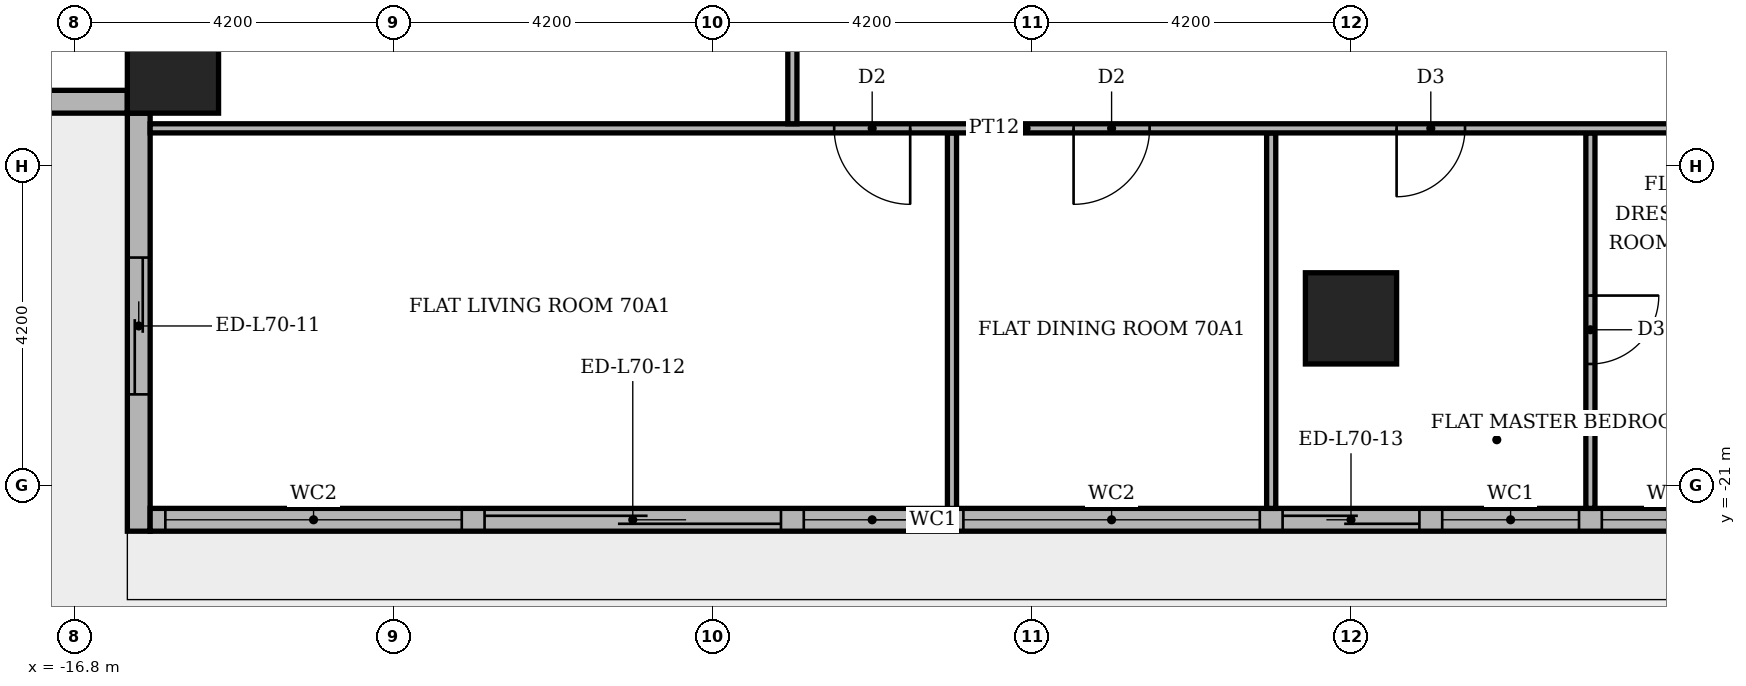
"""IFC4 building model, lengths in metres.
Left out: names, types, materials, properties, quantities, classifications, styles, units other than length and angle.
Written with IfcOpenShell. Run it as: python <this file> out.ifc"""

import sys

from ifc_helpers import new_model, si_unit, direction, frame, frame_2d, origin, origin_2d, place, context, subcontext, project, spatial, rectangle, extrude, element, fill, save


model = new_model("IFC4")
c1 = context("Model", 3, precision=1e-05, world=origin(), true_north=direction((0.0, 1.0)))
c2 = subcontext(c1, "Body", "Model", "MODEL_VIEW")
j1 = project(units=[si_unit("LENGTHUNIT", "METRE"), si_unit("PLANEANGLEUNIT", "RADIAN")], contexts=[c1])
p1 = place(None, origin())
s1 = spatial("IfcSite", under=j1, at=p1, CompositionType="ELEMENT")
p2 = place(p1, origin())
s2 = spatial("IfcBuilding", under=s1, at=p2, CompositionType="ELEMENT")
p3 = place(p2, frame((0.0, 0.0, 292.8)))
s3 = spatial("IfcBuildingStorey", under=s2, at=p3, CompositionType="ELEMENT", Elevation=292.8)
for number, where, z_axis, x_axis in (
    (1, (0.0, -18.8, -0.35), (0.0, 0.0, 1.0), (1.0, 0.0, 0.0)),
    (2, (-15.5, -15.5, -0.35), (0.0, 0.0, 1.0), (1.0, 0.0, 0.0)),
):
    element("IfcColumn", number, at=place(p3, frame(where, z_axis=z_axis, x_axis=x_axis)), inside=s3, PredefinedType="COLUMN", context=c2, shape_type="SweptSolid", body=[
        extrude(rectangle(XDim=1.2, YDim=1.2, at=origin_2d()), origin(), (0.0, 0.0, 1.0), 4.25),
    ])
p4 = place(p3, frame((-21.3, -15.95, 0.0), z_axis=(0.0, 0.0, 1.0), x_axis=(1.0, 0.0, 0.0)))
e3 = element("IfcWall", 3, at=p4, inside=s3, PredefinedType="STANDARD", context=c2, shape_type="SweptSolid", body=[
    extrude(rectangle(XDim=5.2, YDim=0.3, at=frame_2d((2.6, 0.0))), origin(), (0.0, 0.0, 1.0), 3.55),
])
p5 = place(p4, frame((1.5, 0.0, 0.6)))
e4 = element("IfcOpeningElement", 4, at=p5, cuts=e3, PredefinedType="OPENING", context=c2, shape_type="SweptSolid", body=[
    extrude(rectangle(XDim=1.8, YDim=2.4, at=frame_2d((0.9, 1.2))), frame((0.0, 0.16, 0.0), z_axis=(0.0, -1.0, 0.0), x_axis=(1.0, 0.0, 0.0)), (0.0, 0.0, 1.0), 0.32),
])
p6 = place(p3, frame((-15.95, -16.1, 0.0), z_axis=(0.0, 0.0, 1.0), x_axis=(0.0, -1.0, 0.0)))
e5 = element("IfcWall", 5, at=p6, inside=s3, PredefinedType="STANDARD", context=c2, shape_type="SweptSolid", body=[
    extrude(rectangle(XDim=5.5, YDim=0.3, at=frame_2d((2.75, 0.0))), origin(), (0.0, 0.0, 1.0), 3.55),
])
p7 = place(p6, frame((1.9, 0.0, 0.0)))
e6 = element("IfcOpeningElement", 6, at=p7, cuts=e5, PredefinedType="OPENING", context=c2, shape_type="SweptSolid", body=[
    extrude(rectangle(XDim=1.8, YDim=2.4, at=frame_2d((0.9, 1.2))), frame((0.0, 0.16, 0.0), z_axis=(0.0, -1.0, 0.0), x_axis=(1.0, 0.0, 0.0)), (0.0, 0.0, 1.0), 0.32),
])
p8 = place(p3, frame((-15.8, -21.45, 0.0), z_axis=(0.0, 0.0, 1.0), x_axis=(1.0, 0.0, 0.0)))
e7 = element("IfcWall", 7, at=p8, inside=s3, PredefinedType="STANDARD", context=c2, shape_type="SweptSolid", body=[
    extrude(rectangle(XDim=31.9, YDim=0.3, at=frame_2d((15.95, 0.0))), origin(), (0.0, 0.0, 1.0), 3.55),
])
p9 = place(p8, frame((0.2, 0.0, 0.6)))
e8 = element("IfcOpeningElement", 8, at=p9, cuts=e7, PredefinedType="OPENING", context=c2, shape_type="SweptSolid", body=[
    extrude(rectangle(XDim=3.9, YDim=2.4, at=frame_2d((1.95, 1.2))), frame((0.0, 0.16, 0.0), z_axis=(0.0, -1.0, 0.0), x_axis=(1.0, 0.0, 0.0)), (0.0, 0.0, 1.0), 0.32),
])
p10 = place(p8, frame((4.4, 0.0, 0.0)))
e9 = element("IfcOpeningElement", 9, at=p10, cuts=e7, PredefinedType="OPENING", context=c2, shape_type="SweptSolid", body=[
    extrude(rectangle(XDim=3.9, YDim=2.4, at=frame_2d((1.95, 1.2))), frame((0.0, 0.16, 0.0), z_axis=(0.0, -1.0, 0.0), x_axis=(1.0, 0.0, 0.0)), (0.0, 0.0, 1.0), 0.32),
])
p11 = place(p8, frame((8.6, 0.0, 0.6)))
e10 = element("IfcOpeningElement", 10, at=p11, cuts=e7, PredefinedType="OPENING", context=c2, shape_type="SweptSolid", body=[
    extrude(rectangle(XDim=1.8, YDim=2.4, at=frame_2d((0.9, 1.2))), frame((0.0, 0.16, 0.0), z_axis=(0.0, -1.0, 0.0), x_axis=(1.0, 0.0, 0.0)), (0.0, 0.0, 1.0), 0.32),
])
p12 = place(p8, frame((10.7, 0.0, 0.6)))
e11 = element("IfcOpeningElement", 11, at=p12, cuts=e7, PredefinedType="OPENING", context=c2, shape_type="SweptSolid", body=[
    extrude(rectangle(XDim=3.9, YDim=2.4, at=frame_2d((1.95, 1.2))), frame((0.0, 0.16, 0.0), z_axis=(0.0, -1.0, 0.0), x_axis=(1.0, 0.0, 0.0)), (0.0, 0.0, 1.0), 0.32),
])
p13 = place(p8, frame((14.9, 0.0, 0.0)))
e12 = element("IfcOpeningElement", 12, at=p13, cuts=e7, PredefinedType="OPENING", context=c2, shape_type="SweptSolid", body=[
    extrude(rectangle(XDim=1.8, YDim=2.4, at=frame_2d((0.9, 1.2))), frame((0.0, 0.16, 0.0), z_axis=(0.0, -1.0, 0.0), x_axis=(1.0, 0.0, 0.0)), (0.0, 0.0, 1.0), 0.32),
])
p14 = place(p8, frame((17.0, 0.0, 0.6)))
e13 = element("IfcOpeningElement", 13, at=p14, cuts=e7, PredefinedType="OPENING", context=c2, shape_type="SweptSolid", body=[
    extrude(rectangle(XDim=1.8, YDim=2.4, at=frame_2d((0.9, 1.2))), frame((0.0, 0.16, 0.0), z_axis=(0.0, -1.0, 0.0), x_axis=(1.0, 0.0, 0.0)), (0.0, 0.0, 1.0), 0.32),
])
p15 = place(p8, frame((19.1, 0.0, 0.6)))
e14 = element("IfcOpeningElement", 14, at=p15, cuts=e7, PredefinedType="OPENING", context=c2, shape_type="SweptSolid", body=[
    extrude(rectangle(XDim=1.8, YDim=2.4, at=frame_2d((0.9, 1.2))), frame((0.0, 0.16, 0.0), z_axis=(0.0, -1.0, 0.0), x_axis=(1.0, 0.0, 0.0)), (0.0, 0.0, 1.0), 0.32),
])
p16 = place(p8, frame((21.2, 0.0, 0.6)))
e15 = element("IfcOpeningElement", 15, at=p16, cuts=e7, PredefinedType="OPENING", context=c2, shape_type="SweptSolid", body=[
    extrude(rectangle(XDim=1.8, YDim=2.4, at=frame_2d((0.9, 1.2))), frame((0.0, 0.16, 0.0), z_axis=(0.0, -1.0, 0.0), x_axis=(1.0, 0.0, 0.0)), (0.0, 0.0, 1.0), 0.32),
])
p17 = place(p8, frame((23.3, 0.0, 0.6)))
e16 = element("IfcOpeningElement", 16, at=p17, cuts=e7, PredefinedType="OPENING", context=c2, shape_type="SweptSolid", body=[
    extrude(rectangle(XDim=6.0, YDim=2.4, at=frame_2d((3.0, 1.2))), frame((0.0, 0.16, 0.0), z_axis=(0.0, -1.0, 0.0), x_axis=(1.0, 0.0, 0.0)), (0.0, 0.0, 1.0), 0.32),
])
for number, where, z_axis, x_axis in (
    (17, (-5.25, -21.3, 0.0), (0.0, 0.0, 1.0), (0.0, 1.0, 0.0)),
    (18, (-1.05, -21.3, 0.0), (0.0, 0.0, 1.0), (0.0, 1.0, 0.0)),
):
    element("IfcWall", number, at=place(p3, frame(where, z_axis=z_axis, x_axis=x_axis)), inside=s3, PredefinedType="PARTITIONING", context=c2, shape_type="SweptSolid", body=[
        extrude(rectangle(XDim=4.94, YDim=0.12, at=frame_2d((2.47, 0.0))), origin(), (0.0, 0.0, 1.0), 3.55),
    ])
p18 = place(p3, frame((3.15, -21.3, 0.0), z_axis=(0.0, 0.0, 1.0), x_axis=(0.0, 1.0, 0.0)))
e19 = element("IfcWall", 19, at=p18, inside=s3, PredefinedType="PARTITIONING", context=c2, shape_type="SweptSolid", body=[
    extrude(rectangle(XDim=4.94, YDim=0.12, at=frame_2d((2.47, 0.0))), origin(), (0.0, 0.0, 1.0), 3.55),
])
p19 = place(p18, frame((1.9, 0.0, 0.0)))
e20 = element("IfcOpeningElement", 20, at=p19, cuts=e19, PredefinedType="OPENING", context=c2, shape_type="SweptSolid", body=[
    extrude(rectangle(XDim=0.9, YDim=2.1, at=frame_2d((0.45, 1.05))), frame((0.0, 0.07, 0.0), z_axis=(0.0, -1.0, 0.0), x_axis=(1.0, 0.0, 0.0)), (0.0, 0.0, 1.0), 0.14),
])
p20 = place(p3, frame((-15.8, -16.3, 0.0), z_axis=(0.0, 0.0, 1.0), x_axis=(1.0, 0.0, 0.0)))
e21 = element("IfcWall", 21, at=p20, inside=s3, PredefinedType="PARTITIONING", context=c2, shape_type="SweptSolid", body=[
    extrude(rectangle(XDim=23.05, YDim=0.12, at=frame_2d((11.525, 0.0))), origin(), (0.0, 0.0, 1.0), 3.55),
])
p21 = place(p20, frame((9.0, 0.0, 0.0)))
e22 = element("IfcOpeningElement", 22, at=p21, cuts=e21, PredefinedType="OPENING", context=c2, shape_type="SweptSolid", body=[
    extrude(rectangle(XDim=1.0, YDim=2.1, at=frame_2d((0.5, 1.05))), frame((0.0, 0.07, 0.0), z_axis=(0.0, -1.0, 0.0), x_axis=(1.0, 0.0, 0.0)), (0.0, 0.0, 1.0), 0.14),
])
p22 = place(p20, frame((12.15, 0.0, 0.0)))
e23 = element("IfcOpeningElement", 23, at=p22, cuts=e21, PredefinedType="OPENING", context=c2, shape_type="SweptSolid", body=[
    extrude(rectangle(XDim=1.0, YDim=2.1, at=frame_2d((0.5, 1.05))), frame((0.0, 0.07, 0.0), z_axis=(0.0, -1.0, 0.0), x_axis=(1.0, 0.0, 0.0)), (0.0, 0.0, 1.0), 0.14),
])
p23 = place(p20, frame((16.4, 0.0, 0.0)))
e24 = element("IfcOpeningElement", 24, at=p23, cuts=e21, PredefinedType="OPENING", context=c2, shape_type="SweptSolid", body=[
    extrude(rectangle(XDim=0.9, YDim=2.1, at=frame_2d((0.45, 1.05))), frame((0.0, 0.07, 0.0), z_axis=(0.0, -1.0, 0.0), x_axis=(1.0, 0.0, 0.0)), (0.0, 0.0, 1.0), 0.14),
])
p24 = place(p3, frame((-7.35, -16.24, 0.0), z_axis=(0.0, 0.0, 1.0), x_axis=(0.0, 1.0, 0.0)))
e25 = element("IfcWall", 25, at=p24, inside=s3, PredefinedType="PARTITIONING", context=c2, shape_type="SweptSolid", body=[
    extrude(rectangle(XDim=8.79, YDim=0.12, at=frame_2d((4.395, 0.0))), origin(), (0.0, 0.0, 1.0), 3.55),
])
p25 = place(p24, frame((3.965, 0.0, 0.0)))
e26 = element("IfcOpeningElement", 26, at=p25, cuts=e25, PredefinedType="OPENING", context=c2, shape_type="SweptSolid", body=[
    extrude(rectangle(XDim=0.9, YDim=2.1, at=frame_2d((0.45, 1.05))), frame((0.0, 0.07, 0.0), z_axis=(0.0, -1.0, 0.0), x_axis=(1.0, 0.0, 0.0)), (0.0, 0.0, 1.0), 0.14),
])
p26 = place(p7, origin())
e27 = element("IfcDoor", 27, at=p26, inside=s3, OperationType="SLIDING_TO_LEFT", PredefinedType="DOOR", context=c2, shape_type="SweptSolid", body=[
    extrude(rectangle(XDim=1.8, YDim=2.4, at=frame_2d((0.9, 1.2))), frame((0.0, 0.025, 0.0), z_axis=(0.0, -1.0, 0.0), x_axis=(1.0, 0.0, 0.0)), (0.0, 0.0, 1.0), 0.05),
])
fill(e6, e27)
p27 = place(p9, origin())
e28 = element("IfcWindow", 28, at=p27, inside=s3, PartitioningType="SINGLE_PANEL", PredefinedType="WINDOW", context=c2, shape_type="SweptSolid", body=[
    extrude(rectangle(XDim=3.9, YDim=2.4, at=frame_2d((1.95, 1.2))), frame((0.0, 0.03, 0.0), z_axis=(0.0, -1.0, 0.0), x_axis=(1.0, 0.0, 0.0)), (0.0, 0.0, 1.0), 0.06),
])
fill(e8, e28)
p28 = place(p10, origin())
e29 = element("IfcDoor", 29, at=p28, inside=s3, OperationType="SLIDING_TO_RIGHT", PredefinedType="DOOR", context=c2, shape_type="SweptSolid", body=[
    extrude(rectangle(XDim=3.9, YDim=2.4, at=frame_2d((1.95, 1.2))), frame((0.0, 0.025, 0.0), z_axis=(0.0, -1.0, 0.0), x_axis=(1.0, 0.0, 0.0)), (0.0, 0.0, 1.0), 0.05),
])
fill(e9, e29)
p29 = place(p11, origin())
e30 = element("IfcWindow", 30, at=p29, inside=s3, PartitioningType="SINGLE_PANEL", PredefinedType="WINDOW", context=c2, shape_type="SweptSolid", body=[
    extrude(rectangle(XDim=1.8, YDim=2.4, at=frame_2d((0.9, 1.2))), frame((0.0, 0.03, 0.0), z_axis=(0.0, -1.0, 0.0), x_axis=(1.0, 0.0, 0.0)), (0.0, 0.0, 1.0), 0.06),
])
fill(e10, e30)
p30 = place(p12, origin())
e31 = element("IfcWindow", 31, at=p30, inside=s3, PartitioningType="SINGLE_PANEL", PredefinedType="WINDOW", context=c2, shape_type="SweptSolid", body=[
    extrude(rectangle(XDim=3.9, YDim=2.4, at=frame_2d((1.95, 1.2))), frame((0.0, 0.03, 0.0), z_axis=(0.0, -1.0, 0.0), x_axis=(1.0, 0.0, 0.0)), (0.0, 0.0, 1.0), 0.06),
])
fill(e11, e31)
p31 = place(p13, origin())
e32 = element("IfcDoor", 32, at=p31, inside=s3, OperationType="SLIDING_TO_LEFT", PredefinedType="DOOR", context=c2, shape_type="SweptSolid", body=[
    extrude(rectangle(XDim=1.8, YDim=2.4, at=frame_2d((0.9, 1.2))), frame((0.0, 0.025, 0.0), z_axis=(0.0, -1.0, 0.0), x_axis=(1.0, 0.0, 0.0)), (0.0, 0.0, 1.0), 0.05),
])
fill(e12, e32)
p32 = place(p14, origin())
e33 = element("IfcWindow", 33, at=p32, inside=s3, PartitioningType="SINGLE_PANEL", PredefinedType="WINDOW", context=c2, shape_type="SweptSolid", body=[
    extrude(rectangle(XDim=1.8, YDim=2.4, at=frame_2d((0.9, 1.2))), frame((0.0, 0.03, 0.0), z_axis=(0.0, -1.0, 0.0), x_axis=(1.0, 0.0, 0.0)), (0.0, 0.0, 1.0), 0.06),
])
fill(e13, e33)
p33 = place(p15, origin())
e34 = element("IfcWindow", 34, at=p33, inside=s3, PartitioningType="SINGLE_PANEL", PredefinedType="WINDOW", context=c2, shape_type="SweptSolid", body=[
    extrude(rectangle(XDim=1.8, YDim=2.4, at=frame_2d((0.9, 1.2))), frame((0.0, 0.03, 0.0), z_axis=(0.0, -1.0, 0.0), x_axis=(1.0, 0.0, 0.0)), (0.0, 0.0, 1.0), 0.06),
])
fill(e14, e34)
p34 = place(p21, frame((1.0, 0.0, 0.0), z_axis=(0.0, 0.0, 1.0), x_axis=(-1.0, 0.0, 0.0)))
e35 = element("IfcDoor", 35, at=p34, inside=s3, OperationType="SINGLE_SWING_RIGHT", PredefinedType="DOOR", context=c2, shape_type="SweptSolid", body=[
    extrude(rectangle(XDim=1.0, YDim=2.1, at=frame_2d((0.5, 1.05))), frame((0.0, 0.025, 0.0), z_axis=(0.0, -1.0, 0.0), x_axis=(1.0, 0.0, 0.0)), (0.0, 0.0, 1.0), 0.05),
])
fill(e22, e35)
p35 = place(p22, frame((1.0, 0.0, 0.0), z_axis=(0.0, 0.0, 1.0), x_axis=(-1.0, 0.0, 0.0)))
e36 = element("IfcDoor", 36, at=p35, inside=s3, OperationType="SINGLE_SWING_LEFT", PredefinedType="DOOR", context=c2, shape_type="SweptSolid", body=[
    extrude(rectangle(XDim=1.0, YDim=2.1, at=frame_2d((0.5, 1.05))), frame((0.0, 0.025, 0.0), z_axis=(0.0, -1.0, 0.0), x_axis=(1.0, 0.0, 0.0)), (0.0, 0.0, 1.0), 0.05),
])
fill(e23, e36)
p36 = place(p23, frame((0.9, 0.0, 0.0), z_axis=(0.0, 0.0, 1.0), x_axis=(-1.0, 0.0, 0.0)))
e37 = element("IfcDoor", 37, at=p36, inside=s3, OperationType="SINGLE_SWING_LEFT", PredefinedType="DOOR", context=c2, shape_type="SweptSolid", body=[
    extrude(rectangle(XDim=0.9, YDim=2.1, at=frame_2d((0.45, 1.05))), frame((0.0, 0.025, 0.0), z_axis=(0.0, -1.0, 0.0), x_axis=(1.0, 0.0, 0.0)), (0.0, 0.0, 1.0), 0.05),
])
fill(e24, e37)
p37 = place(p19, frame((0.9, 0.0, 0.0), z_axis=(0.0, 0.0, 1.0), x_axis=(-1.0, 0.0, 0.0)))
e38 = element("IfcDoor", 38, at=p37, inside=s3, OperationType="SINGLE_SWING_RIGHT", PredefinedType="DOOR", context=c2, shape_type="SweptSolid", body=[
    extrude(rectangle(XDim=0.9, YDim=2.1, at=frame_2d((0.45, 1.05))), frame((0.0, 0.025, 0.0), z_axis=(0.0, -1.0, 0.0), x_axis=(1.0, 0.0, 0.0)), (0.0, 0.0, 1.0), 0.05),
])
fill(e20, e38)
save(model, sys.argv[1])
